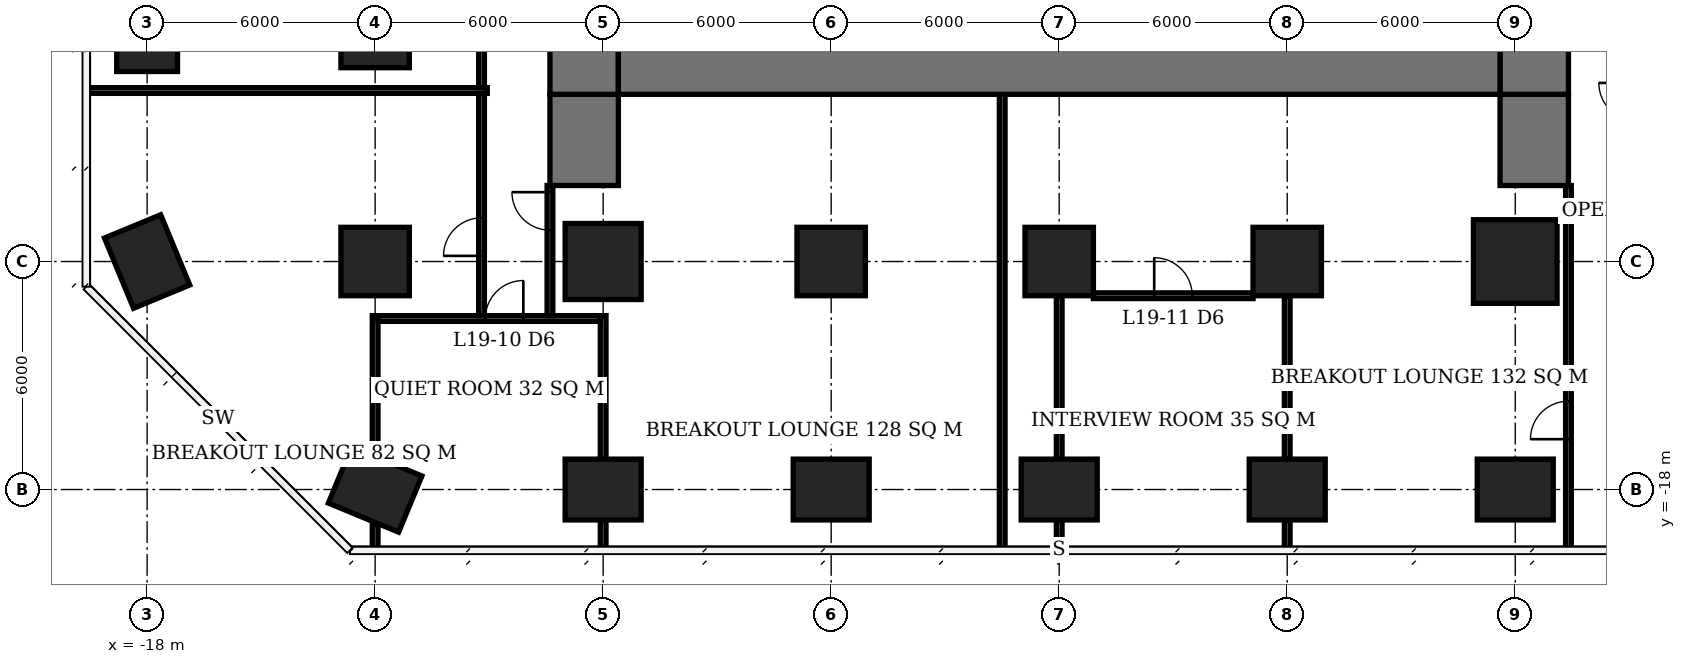
"""IFC4 building model, lengths in metres.
Left out: names, types, materials, properties, quantities, classifications, styles, units other than length and angle.
Written with IfcOpenShell. Run it as: python <this file> out.ifc"""

import sys

from ifc_helpers import new_model, si_unit, direction, frame, frame_2d, origin, origin_2d, place, context, subcontext, project, spatial, rectangle, extrude, element, fill, save


model = new_model("IFC4")
c1 = context("Model", 3, precision=1e-05, world=origin(), true_north=direction((0.0, 1.0)))
c2 = subcontext(c1, "Body", "Model", "MODEL_VIEW")
j1 = project(units=[si_unit("LENGTHUNIT", "METRE"), si_unit("PLANEANGLEUNIT", "RADIAN")], contexts=[c1])
p1 = place(None, origin())
s1 = spatial("IfcSite", under=j1, at=p1, CompositionType="ELEMENT")
p2 = place(p1, origin())
s2 = spatial("IfcBuilding", under=s1, at=p2, CompositionType="ELEMENT")
p3 = place(p2, frame((0.0, 0.0, 80.6)))
s3 = spatial("IfcBuildingStorey", under=s2, at=p3, CompositionType="ELEMENT", Elevation=80.6)
for number, where, z_axis, x_axis in (
    (1, (-18.0, -12.0, 0.0), (0.0, 0.0, 1.0), (-0.383, 0.924, 0.0)),
    (2, (-18.0, -6.0, 0.0), (0.0, 0.0, 1.0), (0.0, 1.0, 0.0)),
    (3, (-12.0, -18.0, 0.0), (0.0, 0.0, 1.0), (-0.924, 0.383, 0.0)),
):
    element("IfcColumn", number, at=place(p3, frame(where, z_axis=z_axis, x_axis=x_axis)), inside=s3, PredefinedType="COLUMN", context=c2, shape_type="SweptSolid", body=[
        extrude(rectangle(XDim=2.0, YDim=1.6, at=origin_2d()), origin(), (0.0, 0.0, 1.0), 3.9),
    ])
for number, where, z_axis, x_axis in (
    (4, (-12.0, -12.0, 0.0), (0.0, 0.0, 1.0), (1.0, 0.0, 0.0)),
    (5, (-12.0, -6.0, 0.0), (0.0, 0.0, 1.0), (1.0, 0.0, 0.0)),
):
    element("IfcColumn", number, at=place(p3, frame(where, z_axis=z_axis, x_axis=x_axis)), inside=s3, PredefinedType="COLUMN", context=c2, shape_type="SweptSolid", body=[
        extrude(rectangle(XDim=1.8, YDim=1.8, at=origin_2d()), origin(), (0.0, 0.0, 1.0), 3.9),
    ])
p4 = place(p3, frame((-6.0, -18.0, 0.0), z_axis=(0.0, 0.0, 1.0), x_axis=(1.0, 0.0, 0.0)))
e6 = element("IfcColumn", 6, at=p4, inside=s3, PredefinedType="COLUMN", context=c2, shape_type="SweptSolid", body=[
    extrude(rectangle(XDim=2.0, YDim=1.6, at=origin_2d()), origin(), (0.0, 0.0, 1.0), 3.9),
])
p5 = place(p3, frame((-6.0, -12.0, 0.0), z_axis=(0.0, 0.0, 1.0), x_axis=(1.0, 0.0, 0.0)))
e7 = element("IfcColumn", 7, at=p5, inside=s3, PredefinedType="COLUMN", context=c2, shape_type="SweptSolid", body=[
    extrude(rectangle(XDim=2.0, YDim=2.0, at=origin_2d()), origin(), (0.0, 0.0, 1.0), 3.9),
])
p6 = place(p3, frame((0.0, -18.0, 0.0), z_axis=(0.0, 0.0, 1.0), x_axis=(1.0, 0.0, 0.0)))
e8 = element("IfcColumn", 8, at=p6, inside=s3, PredefinedType="COLUMN", context=c2, shape_type="SweptSolid", body=[
    extrude(rectangle(XDim=2.0, YDim=1.6, at=origin_2d()), origin(), (0.0, 0.0, 1.0), 3.9),
])
p7 = place(p3, frame((0.0, -12.0, 0.0), z_axis=(0.0, 0.0, 1.0), x_axis=(1.0, 0.0, 0.0)))
e9 = element("IfcColumn", 9, at=p7, inside=s3, PredefinedType="COLUMN", context=c2, shape_type="SweptSolid", body=[
    extrude(rectangle(XDim=1.8, YDim=1.8, at=origin_2d()), origin(), (0.0, 0.0, 1.0), 3.9),
])
p8 = place(p3, frame((6.0, -18.0, 0.0), z_axis=(0.0, 0.0, 1.0), x_axis=(1.0, 0.0, 0.0)))
e10 = element("IfcColumn", 10, at=p8, inside=s3, PredefinedType="COLUMN", context=c2, shape_type="SweptSolid", body=[
    extrude(rectangle(XDim=2.0, YDim=1.6, at=origin_2d()), origin(), (0.0, 0.0, 1.0), 3.9),
])
p9 = place(p3, frame((6.0, -12.0, 0.0), z_axis=(0.0, 0.0, 1.0), x_axis=(1.0, 0.0, 0.0)))
e11 = element("IfcColumn", 11, at=p9, inside=s3, PredefinedType="COLUMN", context=c2, shape_type="SweptSolid", body=[
    extrude(rectangle(XDim=1.8, YDim=1.8, at=origin_2d()), origin(), (0.0, 0.0, 1.0), 3.9),
])
p10 = place(p3, frame((12.0, -18.0, 0.0), z_axis=(0.0, 0.0, 1.0), x_axis=(1.0, 0.0, 0.0)))
e12 = element("IfcColumn", 12, at=p10, inside=s3, PredefinedType="COLUMN", context=c2, shape_type="SweptSolid", body=[
    extrude(rectangle(XDim=2.0, YDim=1.6, at=origin_2d()), origin(), (0.0, 0.0, 1.0), 3.9),
])
p11 = place(p3, frame((12.0, -12.0, 0.0), z_axis=(0.0, 0.0, 1.0), x_axis=(1.0, 0.0, 0.0)))
e13 = element("IfcColumn", 13, at=p11, inside=s3, PredefinedType="COLUMN", context=c2, shape_type="SweptSolid", body=[
    extrude(rectangle(XDim=1.8, YDim=1.8, at=origin_2d()), origin(), (0.0, 0.0, 1.0), 3.9),
])
p12 = place(p3, frame((18.0, -18.0, 0.0), z_axis=(0.0, 0.0, 1.0), x_axis=(1.0, 0.0, 0.0)))
e14 = element("IfcColumn", 14, at=p12, inside=s3, PredefinedType="COLUMN", context=c2, shape_type="SweptSolid", body=[
    extrude(rectangle(XDim=2.0, YDim=1.6, at=origin_2d()), origin(), (0.0, 0.0, 1.0), 3.9),
])
p13 = place(p3, frame((18.0, -12.0, 0.0), z_axis=(0.0, 0.0, 1.0), x_axis=(1.0, 0.0, 0.0)))
e15 = element("IfcColumn", 15, at=p13, inside=s3, PredefinedType="COLUMN", context=c2, shape_type="SweptSolid", body=[
    extrude(rectangle(XDim=2.2, YDim=2.2, at=origin_2d()), origin(), (0.0, 0.0, 1.0), 3.9),
])
p14 = place(p3, frame((-5.6, -6.6, 0.0), z_axis=(0.0, 0.0, 1.0), x_axis=(1.0, 0.0, 0.0)))
e16 = element("IfcWall", 16, at=p14, inside=s3, PredefinedType="SHEAR", context=c2, shape_type="SweptSolid", body=[
    extrude(rectangle(XDim=23.2, YDim=2.0, at=frame_2d((11.6, 0.0))), origin(), (0.0, 0.0, 1.0), 3.9),
])
p15 = place(p3, frame((-6.5, -7.6, 0.0), z_axis=(0.0, 0.0, 1.0), x_axis=(0.0, 1.0, 0.0)))
e17 = element("IfcWall", 17, at=p15, inside=s3, PredefinedType="SHEAR", context=c2, shape_type="SweptSolid", body=[
    extrude(rectangle(XDim=21.2, YDim=1.8, at=frame_2d((10.6, 0.0))), origin(), (0.0, 0.0, 1.0), 3.9),
])
p16 = place(p15, frame((7.8, 0.0, 0.0)))
e18 = element("IfcOpeningElement", 18, at=p16, cuts=e17, PredefinedType="OPENING", context=c2, shape_type="SweptSolid", body=[
    extrude(rectangle(XDim=1.8, YDim=2.4, at=frame_2d((0.9, 1.2))), frame((0.0, 0.91, 0.0), z_axis=(0.0, -1.0, 0.0), x_axis=(1.0, 0.0, 0.0)), (0.0, 0.0, 1.0), 1.82),
])
p17 = place(p3, frame((18.5, -7.6, 0.0), z_axis=(0.0, 0.0, 1.0), x_axis=(0.0, 1.0, 0.0)))
e19 = element("IfcWall", 19, at=p17, inside=s3, PredefinedType="SHEAR", context=c2, shape_type="SweptSolid", body=[
    extrude(rectangle(XDim=21.2, YDim=1.8, at=frame_2d((10.6, 0.0))), origin(), (0.0, 0.0, 1.0), 3.9),
])
p18 = place(p17, frame((9.2, 0.0, 0.0)))
e20 = element("IfcOpeningElement", 20, at=p18, cuts=e19, PredefinedType="OPENING", context=c2, shape_type="SweptSolid", body=[
    extrude(rectangle(XDim=1.8, YDim=2.4, at=frame_2d((0.9, 1.2))), frame((0.0, 0.91, 0.0), z_axis=(0.0, -1.0, 0.0), x_axis=(1.0, 0.0, 0.0)), (0.0, 0.0, 1.0), 1.82),
])
for number, where, z_axis, x_axis in (
    (21, (-6.5, -10.0, 0.0), (0.0, 0.0, 1.0), (0.0, 1.0, 0.0)),
    (22, (18.5, -10.0, 0.0), (0.0, 0.0, 1.0), (0.0, 1.0, 0.0)),
):
    element("IfcWall", number, at=place(p3, frame(where, z_axis=z_axis, x_axis=x_axis)), inside=s3, PredefinedType="SHEAR", context=c2, shape_type="SweptSolid", body=[
        extrude(rectangle(XDim=2.4, YDim=1.8, at=frame_2d((1.2, 0.0))), origin(), (0.0, 0.0, 1.0), 3.9),
    ])
p19 = place(p3, frame((-11.925, -13.5, 0.0), z_axis=(0.0, 0.0, 1.0), x_axis=(1.0, 0.0, 0.0)))
e23 = element("IfcWall", 23, at=p19, inside=s3, PredefinedType="PARTITIONING", context=c2, shape_type="SweptSolid", body=[
    extrude(rectangle(XDim=5.85, YDim=0.15, at=frame_2d((2.925, 0.0))), origin(), (0.0, 0.0, 1.0), 3.65),
])
p20 = place(p19, frame((2.825, 0.0, 0.0)))
e24 = element("IfcOpeningElement", 24, at=p20, cuts=e23, PredefinedType="OPENING", context=c2, shape_type="SweptSolid", body=[
    extrude(rectangle(XDim=1.0, YDim=2.1, at=frame_2d((0.5, 1.05))), frame((0.0, 0.085, 0.0), z_axis=(0.0, -1.0, 0.0), x_axis=(1.0, 0.0, 0.0)), (0.0, 0.0, 1.0), 0.17),
])
p21 = place(p3, frame((6.9, -12.9, 0.0), z_axis=(0.0, 0.0, 1.0), x_axis=(1.0, 0.0, 0.0)))
e25 = element("IfcWall", 25, at=p21, inside=s3, PredefinedType="PARTITIONING", context=c2, shape_type="SweptSolid", body=[
    extrude(rectangle(XDim=4.2, YDim=0.15, at=frame_2d((2.1, 0.0))), origin(), (0.0, 0.0, 1.0), 3.65),
])
p22 = place(p21, frame((1.6, 0.0, 0.0)))
e26 = element("IfcOpeningElement", 26, at=p22, cuts=e25, PredefinedType="OPENING", context=c2, shape_type="SweptSolid", body=[
    extrude(rectangle(XDim=1.0, YDim=2.1, at=frame_2d((0.5, 1.05))), frame((0.0, 0.085, 0.0), z_axis=(0.0, -1.0, 0.0), x_axis=(1.0, 0.0, 0.0)), (0.0, 0.0, 1.0), 0.17),
])
p23 = place(p3, frame((-12.0, -19.6, 0.0), z_axis=(0.0, 0.0, 1.0), x_axis=(0.0, 1.0, 0.0)))
e27 = element("IfcWall", 27, at=p23, inside=s3, PredefinedType="PARTITIONING", context=c2, shape_type="SweptSolid", body=[
    extrude(rectangle(XDim=0.703, YDim=0.15, at=frame_2d((0.352, 0.0))), origin(), (0.0, 0.0, 1.0), 3.65),
])
p24 = place(p3, frame((-12.0, -17.103, 0.0), z_axis=(0.0, 0.0, 1.0), x_axis=(0.0, 1.0, 0.0)))
e28 = element("IfcWall", 28, at=p24, inside=s3, PredefinedType="PARTITIONING", context=c2, shape_type="SweptSolid", body=[
    extrude(rectangle(XDim=3.678, YDim=0.15, at=frame_2d((1.839, 0.0))), origin(), (0.0, 0.0, 1.0), 3.65),
])
p25 = place(p3, frame((-6.0, -19.6, 0.0), z_axis=(0.0, 0.0, 1.0), x_axis=(0.0, 1.0, 0.0)))
e29 = element("IfcWall", 29, at=p25, inside=s3, PredefinedType="PARTITIONING", context=c2, shape_type="SweptSolid", body=[
    extrude(rectangle(XDim=0.8, YDim=0.15, at=frame_2d((0.4, 0.0))), origin(), (0.0, 0.0, 1.0), 3.65),
])
p26 = place(p3, frame((-6.0, -17.2, 0.0), z_axis=(0.0, 0.0, 1.0), x_axis=(0.0, 1.0, 0.0)))
e30 = element("IfcWall", 30, at=p26, inside=s3, PredefinedType="PARTITIONING", context=c2, shape_type="SweptSolid", body=[
    extrude(rectangle(XDim=3.775, YDim=0.15, at=frame_2d((1.887, 0.0))), origin(), (0.0, 0.0, 1.0), 3.65),
])
p27 = place(p3, frame((6.0, -19.55, 0.0), z_axis=(0.0, 0.0, 1.0), x_axis=(0.0, 1.0, 0.0)))
e31 = element("IfcWall", 31, at=p27, inside=s3, PredefinedType="PARTITIONING", context=c2, shape_type="SweptSolid", body=[
    extrude(rectangle(XDim=0.75, YDim=0.15, at=frame_2d((0.375, 0.0))), origin(), (0.0, 0.0, 1.0), 3.65),
])
p28 = place(p3, frame((6.0, -17.2, 0.0), z_axis=(0.0, 0.0, 1.0), x_axis=(0.0, 1.0, 0.0)))
e32 = element("IfcWall", 32, at=p28, inside=s3, PredefinedType="PARTITIONING", context=c2, shape_type="SweptSolid", body=[
    extrude(rectangle(XDim=4.3, YDim=0.15, at=frame_2d((2.15, 0.0))), origin(), (0.0, 0.0, 1.0), 3.65),
])
p29 = place(p3, frame((12.0, -19.6, 0.0), z_axis=(0.0, 0.0, 1.0), x_axis=(0.0, 1.0, 0.0)))
e33 = element("IfcWall", 33, at=p29, inside=s3, PredefinedType="PARTITIONING", context=c2, shape_type="SweptSolid", body=[
    extrude(rectangle(XDim=0.8, YDim=0.15, at=frame_2d((0.4, 0.0))), origin(), (0.0, 0.0, 1.0), 3.65),
])
p30 = place(p3, frame((12.0, -17.2, 0.0), z_axis=(0.0, 0.0, 1.0), x_axis=(0.0, 1.0, 0.0)))
e34 = element("IfcWall", 34, at=p30, inside=s3, PredefinedType="PARTITIONING", context=c2, shape_type="SweptSolid", body=[
    extrude(rectangle(XDim=4.3, YDim=0.15, at=frame_2d((2.15, 0.0))), origin(), (0.0, 0.0, 1.0), 3.65),
])
p31 = place(p3, frame((-19.6, -7.5, 0.0), z_axis=(0.0, 0.0, 1.0), x_axis=(1.0, 0.0, 0.0)))
e35 = element("IfcWall", 35, at=p31, inside=s3, PredefinedType="PARTITIONING", context=c2, shape_type="SweptSolid", body=[
    extrude(rectangle(XDim=10.55, YDim=0.15, at=frame_2d((5.275, 0.0))), origin(), (0.0, 0.0, 1.0), 3.65),
])
p32 = place(p3, frame((-9.2, -13.425, 0.0), z_axis=(0.0, 0.0, 1.0), x_axis=(0.0, 1.0, 0.0)))
e36 = element("IfcWall", 36, at=p32, inside=s3, PredefinedType="PARTITIONING", context=c2, shape_type="SweptSolid", body=[
    extrude(rectangle(XDim=5.85, YDim=0.15, at=frame_2d((2.925, 0.0))), origin(), (0.0, 0.0, 1.0), 3.65),
])
p33 = place(p32, frame((1.574, 0.0, 0.0)))
e37 = element("IfcOpeningElement", 37, at=p33, cuts=e36, PredefinedType="OPENING", context=c2, shape_type="SweptSolid", body=[
    extrude(rectangle(XDim=1.0, YDim=2.1, at=frame_2d((0.5, 1.05))), frame((0.0, 0.085, 0.0), z_axis=(0.0, -1.0, 0.0), x_axis=(1.0, 0.0, 0.0)), (0.0, 0.0, 1.0), 0.17),
])
p34 = place(p3, frame((-9.2, -7.425, 0.0), z_axis=(0.0, 0.0, 1.0), x_axis=(0.0, 1.0, 0.0)))
e38 = element("IfcWall", 38, at=p34, inside=s3, PredefinedType="PARTITIONING", context=c2, shape_type="SweptSolid", body=[
    extrude(rectangle(XDim=23.85, YDim=0.15, at=frame_2d((11.925, 0.0))), origin(), (0.0, 0.0, 1.0), 3.65),
])
p35 = place(p34, frame((7.825, 0.0, 0.0)))
e39 = element("IfcOpeningElement", 39, at=p35, cuts=e38, PredefinedType="OPENING", context=c2, shape_type="SweptSolid", body=[
    extrude(rectangle(XDim=1.0, YDim=2.1, at=frame_2d((0.5, 1.05))), frame((0.0, 0.085, 0.0), z_axis=(0.0, -1.0, 0.0), x_axis=(1.0, 0.0, 0.0)), (0.0, 0.0, 1.0), 0.17),
])
p36 = place(p3, frame((-7.4, -13.425, 0.0), z_axis=(0.0, 0.0, 1.0), x_axis=(0.0, 1.0, 0.0)))
e40 = element("IfcWall", 40, at=p36, inside=s3, PredefinedType="PARTITIONING", context=c2, shape_type="SweptSolid", body=[
    extrude(rectangle(XDim=3.425, YDim=0.15, at=frame_2d((1.712, 0.0))), origin(), (0.0, 0.0, 1.0), 3.65),
])
p37 = place(p36, frame((2.25, 0.0, 0.0)))
e41 = element("IfcOpeningElement", 41, at=p37, cuts=e40, PredefinedType="OPENING", context=c2, shape_type="SweptSolid", body=[
    extrude(rectangle(XDim=1.0, YDim=2.1, at=frame_2d((0.5, 1.05))), frame((0.0, 0.085, 0.0), z_axis=(0.0, -1.0, 0.0), x_axis=(1.0, 0.0, 0.0)), (0.0, 0.0, 1.0), 0.17),
])
p38 = place(p3, frame((4.5, -19.6, 0.0), z_axis=(0.0, 0.0, 1.0), x_axis=(0.0, 1.0, 0.0)))
e42 = element("IfcWall", 42, at=p38, inside=s3, PredefinedType="PARTITIONING", context=c2, shape_type="SweptSolid", body=[
    extrude(rectangle(XDim=12.0, YDim=0.15, at=frame_2d((6.0, 0.0))), origin(), (0.0, 0.0, 1.0), 3.65),
])
p39 = place(p3, frame((19.4, -19.6, 0.0), z_axis=(0.0, 0.0, 1.0), x_axis=(0.0, 1.0, 0.0)))
e43 = element("IfcWall", 43, at=p39, inside=s3, PredefinedType="PARTITIONING", context=c2, shape_type="SweptSolid", body=[
    extrude(rectangle(XDim=9.6, YDim=0.15, at=frame_2d((4.8, 0.0))), origin(), (0.0, 0.0, 1.0), 3.65),
])
p40 = place(p39, frame((2.925, 0.0, 0.0)))
e44 = element("IfcOpeningElement", 44, at=p40, cuts=e43, PredefinedType="OPENING", context=c2, shape_type="SweptSolid", body=[
    extrude(rectangle(XDim=1.0, YDim=2.1, at=frame_2d((0.5, 1.05))), frame((0.0, 0.085, 0.0), z_axis=(0.0, -1.0, 0.0), x_axis=(1.0, 0.0, 0.0)), (0.0, 0.0, 1.0), 0.17),
])
p41 = place(p20, origin())
e45 = element("IfcDoor", 45, at=p41, inside=s3, OperationType="SINGLE_SWING_RIGHT", PredefinedType="DOOR", context=c2, shape_type="SweptSolid", body=[
    extrude(rectangle(XDim=1.0, YDim=2.1, at=frame_2d((0.5, 1.05))), frame((0.0, 0.025, 0.0), z_axis=(0.0, -1.0, 0.0), x_axis=(1.0, 0.0, 0.0)), (0.0, 0.0, 1.0), 0.05),
])
fill(e24, e45)
p42 = place(p22, origin())
e46 = element("IfcDoor", 46, at=p42, inside=s3, OperationType="SINGLE_SWING_LEFT", PredefinedType="DOOR", context=c2, shape_type="SweptSolid", body=[
    extrude(rectangle(XDim=1.0, YDim=2.1, at=frame_2d((0.5, 1.05))), frame((0.0, 0.025, 0.0), z_axis=(0.0, -1.0, 0.0), x_axis=(1.0, 0.0, 0.0)), (0.0, 0.0, 1.0), 0.05),
])
fill(e26, e46)
p43 = place(p40, origin())
e47 = element("IfcDoor", 47, at=p43, inside=s3, OperationType="SINGLE_SWING_LEFT", PredefinedType="DOOR", context=c2, shape_type="SweptSolid", body=[
    extrude(rectangle(XDim=1.0, YDim=2.1, at=frame_2d((0.5, 1.05))), frame((0.0, 0.025, 0.0), z_axis=(0.0, -1.0, 0.0), x_axis=(1.0, 0.0, 0.0)), (0.0, 0.0, 1.0), 0.05),
])
fill(e44, e47)
p44 = place(p33, origin())
e48 = element("IfcDoor", 48, at=p44, inside=s3, OperationType="SINGLE_SWING_LEFT", PredefinedType="DOOR", context=c2, shape_type="SweptSolid", body=[
    extrude(rectangle(XDim=1.0, YDim=2.1, at=frame_2d((0.5, 1.05))), frame((0.0, 0.025, 0.0), z_axis=(0.0, -1.0, 0.0), x_axis=(1.0, 0.0, 0.0)), (0.0, 0.0, 1.0), 0.05),
])
fill(e37, e48)
p45 = place(p37, origin())
e49 = element("IfcDoor", 49, at=p45, inside=s3, OperationType="SINGLE_SWING_RIGHT", PredefinedType="DOOR", context=c2, shape_type="SweptSolid", body=[
    extrude(rectangle(XDim=1.0, YDim=2.1, at=frame_2d((0.5, 1.05))), frame((0.0, 0.025, 0.0), z_axis=(0.0, -1.0, 0.0), x_axis=(1.0, 0.0, 0.0)), (0.0, 0.0, 1.0), 0.05),
])
fill(e41, e49)
save(model, sys.argv[1])
